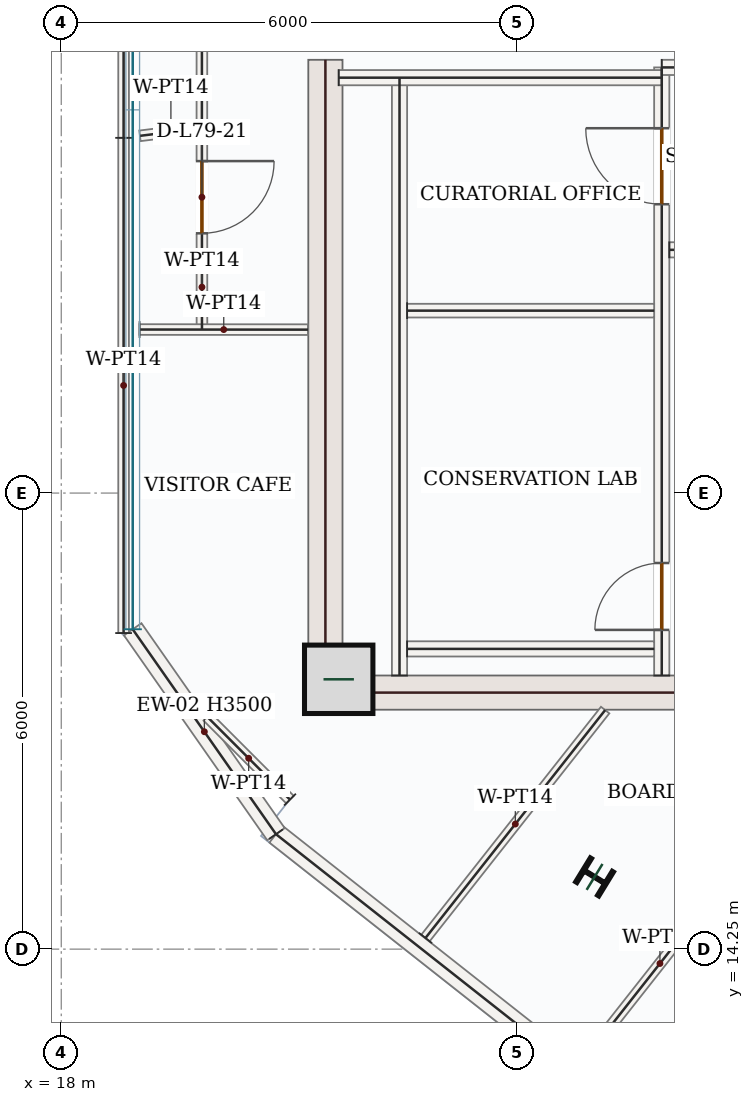
"""IFC4 building model, lengths in metres.
Left out: names, types, materials, properties, quantities, classifications, styles, units other than length and angle.
Written with IfcOpenShell. Run it as: python <this file> out.ifc"""

import sys

from ifc_helpers import new_model, si_unit, direction, frame, frame_2d, origin, origin_2d, place, context, subcontext, project, spatial, rectangle, i_section, extrude, source, transform, mapped, element, fill, save


model = new_model("IFC4")
c1 = context("Model", 3, precision=1e-05, world=origin(), true_north=direction((0.0, 1.0)))
c2 = subcontext(c1, "Body", "Model", "MODEL_VIEW")
j1 = project(units=[si_unit("LENGTHUNIT", "METRE"), si_unit("PLANEANGLEUNIT", "RADIAN")], contexts=[c1])
p1 = place(None, origin())
s1 = spatial("IfcSite", under=j1, at=p1, CompositionType="ELEMENT")
p2 = place(p1, origin())
s2 = spatial("IfcBuilding", under=s1, at=p2, CompositionType="ELEMENT")
p3 = place(p2, frame((0.0, 0.0, 327.3)))
s3 = spatial("IfcBuildingStorey", under=s2, at=p3, CompositionType="ELEMENT", Elevation=327.3)
m1 = source(origin(), c2, "Body", "SweptSolid", [
    extrude(rectangle(XDim=8.55, YDim=0.45, at=frame_2d((4.275, 0.0))), origin(), (0.0, 0.0, 1.0), 3.5),
])
p4 = place(p3, frame((21.475, 17.4, 0.0), z_axis=(0.0, 0.0, 1.0), x_axis=(0.0, 1.0, 0.0)))
e1 = element("IfcWall", 1, at=p4, inside=s3, PredefinedType="SHEAR", context=c2, shape_type="MappedRepresentation", body=[
    mapped(m1, transform((0.0, 0.0, 0.0), x_axis=(1.0, 0.0, 0.0), y_axis=(0.0, 1.0, 0.0), z_axis=(0.0, 0.0, 1.0), scale=1.0)),
])
m2 = source(origin(), c2, "Body", "SweptSolid", [
    extrude(rectangle(XDim=7.1, YDim=0.45, at=frame_2d((3.55, 0.0))), origin(), (0.0, 0.0, 1.0), 3.5),
])
p5 = place(p3, frame((21.7, 17.625, 0.0), z_axis=(0.0, 0.0, 1.0), x_axis=(1.0, 0.0, 0.0)))
e2 = element("IfcWall", 2, at=p5, inside=s3, PredefinedType="SHEAR", context=c2, shape_type="MappedRepresentation", body=[
    mapped(m2, transform((0.0, 0.0, 0.0), x_axis=(1.0, 0.0, 0.0), y_axis=(0.0, 1.0, 0.0), z_axis=(0.0, 0.0, 1.0), scale=1.0)),
])
m3 = source(origin(), c2, "Body", "SweptSolid", [
    extrude(rectangle(XDim=0.9, YDim=0.9, at=origin_2d()), origin(), (0.0, 0.0, 1.0), 3.75),
])
p6 = place(p3, frame((21.65, 17.8, 0.0), z_axis=(0.0, 0.0, 1.0), x_axis=(1.0, 0.0, 0.0)))
e3 = element("IfcColumn", 3, at=p6, inside=s3, PredefinedType="COLUMN", context=c2, shape_type="MappedRepresentation", body=[
    mapped(m3, transform((0.0, 0.0, 0.0), x_axis=(1.0, 0.0, 0.0), y_axis=(0.0, 1.0, 0.0), z_axis=(0.0, 0.0, 1.0), scale=1.0)),
])
m4 = source(origin(), c2, "Body", "SweptSolid", [
    extrude(i_section(OverallWidth=0.369, OverallDepth=0.356, WebThickness=0.011, FlangeThickness=0.018, FilletRadius=0.018, at=origin_2d()), origin(), (0.0, 0.0, 1.0), 3.75),
])
p7 = place(p3, frame((25.016, 15.2, 0.0), z_axis=(0.0, 0.0, 1.0), x_axis=(0.522498564716, 0.852640164354, 0.0)))
e4 = element("IfcColumn", 4, at=p7, inside=s3, PredefinedType="COLUMN", context=c2, shape_type="MappedRepresentation", body=[
    mapped(m4, transform((0.0, 0.0, 0.0), x_axis=(1.0, 0.0, 0.0), y_axis=(0.0, 1.0, 0.0), z_axis=(0.0, 0.0, 1.0), scale=1.0)),
])
m5 = source(origin(), c2, "Body", "SweptSolid", [
    extrude(rectangle(XDim=9.92, YDim=0.28, at=frame_2d((4.96, 0.0))), origin(), (0.0, 0.0, 1.0), 3.5),
])
p8 = place(p3, frame((28.615, 9.621, 0.0), z_axis=(0.0, 0.0, 1.0), x_axis=(-0.785317257435, 0.619093535077, 0.0)))
e5 = element("IfcWall", 5, at=p8, inside=s3, PredefinedType="SOLIDWALL", context=c2, shape_type="MappedRepresentation", body=[
    mapped(m5, transform((0.0, 0.0, 0.0), x_axis=(1.0, 0.0, 0.0), y_axis=(0.0, 1.0, 0.0), z_axis=(0.0, 0.0, 1.0), scale=1.0)),
])
m6 = source(origin(), c2, "Body", "SweptSolid", [
    extrude(rectangle(XDim=3.29, YDim=0.28, at=frame_2d((1.645, 0.0))), origin(), (0.0, 0.0, 1.0), 3.5),
])
p9 = place(p3, frame((20.825, 15.762, 0.0), z_axis=(0.0, 0.0, 1.0), x_axis=(-0.573043854491, 0.819524704222, 0.0)))
e6 = element("IfcWall", 6, at=p9, inside=s3, PredefinedType="SOLIDWALL", context=c2, shape_type="MappedRepresentation", body=[
    mapped(m6, transform((0.0, 0.0, 0.0), x_axis=(1.0, 0.0, 0.0), y_axis=(0.0, 1.0, 0.0), z_axis=(0.0, 0.0, 1.0), scale=1.0)),
])
m7 = source(origin(), c2, "Body", "SweptSolid", [
    extrude(rectangle(XDim=7.87, YDim=0.2, at=frame_2d((3.935, 0.0))), origin(), (0.0, 0.0, 1.0), 3.5),
])
p10 = place(p3, frame((22.45, 17.85, 0.0), z_axis=(0.0, 0.0, 1.0), x_axis=(0.0, 1.0, 0.0)))
e7 = element("IfcWall", 7, at=p10, inside=s3, PredefinedType="SOLIDWALL", context=c2, shape_type="MappedRepresentation", body=[
    mapped(m7, transform((0.0, 0.0, 0.0), x_axis=(1.0, 0.0, 0.0), y_axis=(0.0, 1.0, 0.0), z_axis=(0.0, 0.0, 1.0), scale=1.0)),
])
p11 = place(p3, frame((25.9, 17.85, 0.0), z_axis=(0.0, 0.0, 1.0), x_axis=(0.0, 1.0, 0.0)))
e8 = element("IfcWall", 8, at=p11, inside=s3, PredefinedType="SOLIDWALL", context=c2, shape_type="SweptSolid", body=[
    extrude(rectangle(XDim=8.0, YDim=0.2, at=frame_2d((4.0, 0.0))), origin(), (0.0, 0.0, 1.0), 3.5),
])
p12 = place(p11, frame((6.2, 0.0, 0.0)))
e9 = element("IfcOpeningElement", 9, at=p12, cuts=e8, PredefinedType="OPENING", context=c2, shape_type="SweptSolid", body=[
    extrude(rectangle(XDim=1.0, YDim=2.15, at=frame_2d((0.5, 1.075))), frame((0.0, 0.11, 0.0), z_axis=(0.0, -1.0, 0.0), x_axis=(1.0, 0.0, 0.0)), (0.0, 0.0, 1.0), 0.22),
])
p13 = place(p11, frame((0.6, 0.0, 0.0)))
e10 = element("IfcOpeningElement", 10, at=p13, cuts=e8, PredefinedType="OPENING", context=c2, shape_type="SweptSolid", body=[
    extrude(rectangle(XDim=0.88, YDim=2.1, at=frame_2d((0.44, 1.05))), frame((0.0, 0.11, 0.0), z_axis=(0.0, -1.0, 0.0), x_axis=(1.0, 0.0, 0.0)), (0.0, 0.0, 1.0), 0.22),
])
m8 = source(origin(), c2, "Body", "SweptSolid", [
    extrude(rectangle(XDim=4.25, YDim=0.2, at=frame_2d((2.125, 0.0))), origin(), (0.0, 0.0, 1.0), 3.5),
])
p14 = place(p3, frame((21.65, 25.715, 0.0), z_axis=(0.0, 0.0, 1.0), x_axis=(1.0, 0.0, 0.0)))
e11 = element("IfcWall", 11, at=p14, inside=s3, PredefinedType="SOLIDWALL", context=c2, shape_type="MappedRepresentation", body=[
    mapped(m8, transform((0.0, 0.0, 0.0), x_axis=(1.0, 0.0, 0.0), y_axis=(0.0, 1.0, 0.0), z_axis=(0.0, 0.0, 1.0), scale=1.0)),
])
m9 = source(origin(), c2, "Body", "SweptSolid", [
    extrude(rectangle(XDim=3.0, YDim=0.2, at=frame_2d((1.5, 0.0))), origin(), (0.0, 0.0, 1.0), 3.5),
])
p15 = place(p3, frame((25.9, 25.85, 0.0), z_axis=(0.0, 0.0, 1.0), x_axis=(1.0, 0.0, 0.0)))
e12 = element("IfcWall", 12, at=p15, inside=s3, PredefinedType="SOLIDWALL", context=c2, shape_type="MappedRepresentation", body=[
    mapped(m9, transform((0.0, 0.0, 0.0), x_axis=(1.0, 0.0, 0.0), y_axis=(0.0, 1.0, 0.0), z_axis=(0.0, 0.0, 1.0), scale=1.0)),
])
m10 = source(origin(), c2, "Body", "SweptSolid", [
    extrude(rectangle(XDim=3.25, YDim=0.2, at=frame_2d((1.625, 0.0))), origin(), (0.0, 0.0, 1.0), 3.5),
])
p16 = place(p3, frame((22.55, 18.2, 0.0), z_axis=(0.0, 0.0, 1.0), x_axis=(1.0, 0.0, 0.0)))
e13 = element("IfcWall", 13, at=p16, inside=s3, PredefinedType="SOLIDWALL", context=c2, shape_type="MappedRepresentation", body=[
    mapped(m10, transform((0.0, 0.0, 0.0), x_axis=(1.0, 0.0, 0.0), y_axis=(0.0, 1.0, 0.0), z_axis=(0.0, 0.0, 1.0), scale=1.0)),
])
m11 = source(origin(), c2, "Body", "SweptSolid", [
    extrude(rectangle(XDim=3.25, YDim=0.18, at=frame_2d((1.625, 0.0))), origin(), (0.0, 0.0, 1.0), 3.5),
])
p17 = place(p3, frame((22.55, 22.65, 0.0), z_axis=(0.0, 0.0, 1.0), x_axis=(1.0, 0.0, 0.0)))
e14 = element("IfcWall", 14, at=p17, inside=s3, PredefinedType="PARTITIONING", context=c2, shape_type="MappedRepresentation", body=[
    mapped(m11, transform((0.0, 0.0, 0.0), x_axis=(1.0, 0.0, 0.0), y_axis=(0.0, 1.0, 0.0), z_axis=(0.0, 0.0, 1.0), scale=1.0)),
])
m12 = source(origin(), c2, "Body", "SweptSolid", [
    extrude(rectangle(XDim=2.75, YDim=0.2, at=frame_2d((1.375, 0.0))), origin(), (0.0, 0.0, 1.0), 3.5),
])
p18 = place(p3, frame((26.0, 23.45, 0.0), z_axis=(0.0, 0.0, 1.0), x_axis=(1.0, 0.0, 0.0)))
e15 = element("IfcWall", 15, at=p18, inside=s3, PredefinedType="SOLIDWALL", context=c2, shape_type="MappedRepresentation", body=[
    mapped(m12, transform((0.0, 0.0, 0.0), x_axis=(1.0, 0.0, 0.0), y_axis=(0.0, 1.0, 0.0), z_axis=(0.0, 0.0, 1.0), scale=1.0)),
])
m13 = source(origin(), c2, "Body", "SweptSolid", [
    extrude(rectangle(XDim=3.818, YDim=0.14, at=frame_2d((1.909, 0.0))), origin(), (0.0, 0.0, 1.0), 3.5),
])
p19 = place(p3, frame((22.792, 14.396, 0.0), z_axis=(0.0, 0.0, 1.0), x_axis=(0.619119655452, 0.78529666511, 0.0)))
e16 = element("IfcWall", 16, at=p19, inside=s3, PredefinedType="PARTITIONING", context=c2, shape_type="MappedRepresentation", body=[
    mapped(m13, transform((0.0, 0.0, 0.0), x_axis=(1.0, 0.0, 0.0), y_axis=(0.0, 1.0, 0.0), z_axis=(0.0, 0.0, 1.0), scale=1.0)),
])
p20 = place(p3, frame((28.177, 16.98, 0.0), z_axis=(0.0, 0.0, 1.0), x_axis=(-0.619105408422, -0.785307897109, 0.0)))
e17 = element("IfcWall", 17, at=p20, inside=s3, PredefinedType="PARTITIONING", context=c2, shape_type="SweptSolid", body=[
    extrude(rectangle(XDim=5.363, YDim=0.14, at=frame_2d((2.682, 0.0))), origin(), (0.0, 0.0, 1.0), 3.5),
])
p21 = place(p20, frame((0.971, 0.0, 0.0)))
e18 = element("IfcOpeningElement", 18, at=p21, cuts=e17, PredefinedType="OPENING", context=c2, shape_type="SweptSolid", body=[
    extrude(rectangle(XDim=0.95, YDim=2.15, at=frame_2d((0.475, 1.075))), frame((0.0, 0.08, 0.0), z_axis=(0.0, -1.0, 0.0), x_axis=(1.0, 0.0, 0.0)), (0.0, 0.0, 1.0), 0.16),
])
p22 = place(p3, frame((19.853, 31.523, 0.0), z_axis=(0.0, 0.0, 1.0), x_axis=(-0.000377187662, -0.999999928865, 0.0)))
e19 = element("IfcWall", 19, at=p22, inside=s3, PredefinedType="PARTITIONING", context=c2, shape_type="SweptSolid", body=[
    extrude(rectangle(XDim=6.473, YDim=0.14, at=frame_2d((3.236, 0.0))), origin(), (0.0, 0.0, 1.0), 3.5),
])
p23 = place(p22, frame((4.308, 0.0, 0.0)))
e20 = element("IfcOpeningElement", 20, at=p23, cuts=e19, PredefinedType="OPENING", context=c2, shape_type="SweptSolid", body=[
    extrude(rectangle(XDim=0.95, YDim=2.15, at=frame_2d((0.475, 1.075))), frame((0.0, 0.08, 0.0), z_axis=(0.0, -1.0, 0.0), x_axis=(1.0, 0.0, 0.0)), (0.0, 0.0, 1.0), 0.16),
])
m14 = source(origin(), c2, "Body", "SweptSolid", [
    extrude(rectangle(XDim=0.821, YDim=0.14, at=frame_2d((0.41, 0.0))), origin(), (0.0, 0.0, 1.0), 3.5),
])
p24 = place(p3, frame((19.85, 25.05, 0.0), z_axis=(0.0, 0.0, 1.0), x_axis=(-0.992500466698, -0.122240842617, 0.0)))
e21 = element("IfcWall", 21, at=p24, inside=s3, PredefinedType="PARTITIONING", context=c2, shape_type="MappedRepresentation", body=[
    mapped(m14, transform((0.0, 0.0, 0.0), x_axis=(1.0, 0.0, 0.0), y_axis=(0.0, 1.0, 0.0), z_axis=(0.0, 0.0, 1.0), scale=1.0)),
])
m15 = source(origin(), c2, "Body", "SweptSolid", [
    extrude(rectangle(XDim=6.968, YDim=0.14, at=frame_2d((3.484, 0.0))), origin(), (0.0, 0.0, 1.0), 3.5),
])
p25 = place(p3, frame((18.82, 24.923, 0.0), z_axis=(0.0, 0.0, 1.0), x_axis=(0.0, 1.0, 0.0)))
e22 = element("IfcWall", 22, at=p25, inside=s3, PredefinedType="PARTITIONING", context=c2, shape_type="MappedRepresentation", body=[
    mapped(m15, transform((0.0, 0.0, 0.0), x_axis=(1.0, 0.0, 0.0), y_axis=(0.0, 1.0, 0.0), z_axis=(0.0, 0.0, 1.0), scale=1.0)),
])
p26 = place(p3, frame((19.85, 24.975, 0.0), z_axis=(0.0, 0.0, 1.0), x_axis=(0.000379434615, -0.999999928015, 0.0)))
e23 = element("IfcWall", 23, at=p26, inside=s3, PredefinedType="PARTITIONING", context=c2, shape_type="SweptSolid", body=[
    extrude(rectangle(XDim=2.574, YDim=0.14, at=frame_2d((1.287, 0.0))), origin(), (0.0, 0.0, 1.0), 3.5),
])
p27 = place(p26, frame((0.357, 0.0, 0.0)))
e24 = element("IfcOpeningElement", 24, at=p27, cuts=e23, PredefinedType="OPENING", context=c2, shape_type="SweptSolid", body=[
    extrude(rectangle(XDim=0.95, YDim=2.15, at=frame_2d((0.475, 1.075))), frame((0.0, 0.08, 0.0), z_axis=(0.0, -1.0, 0.0), x_axis=(1.0, 0.0, 0.0)), (0.0, 0.0, 1.0), 0.16),
])
m16 = source(origin(), c2, "Body", "SweptSolid", [
    extrude(rectangle(XDim=2.215, YDim=0.14, at=frame_2d((1.107, 0.0))), origin(), (0.0, 0.0, 1.0), 3.5),
])
p28 = place(p3, frame((19.03, 22.402, 0.0), z_axis=(0.0, 0.0, 1.0), x_axis=(0.999999702379, -0.000771519665, 0.0)))
e25 = element("IfcWall", 25, at=p28, inside=s3, PredefinedType="PARTITIONING", context=c2, shape_type="MappedRepresentation", body=[
    mapped(m16, transform((0.0, 0.0, 0.0), x_axis=(1.0, 0.0, 0.0), y_axis=(0.0, 1.0, 0.0), z_axis=(0.0, 0.0, 1.0), scale=1.0)),
])
m17 = source(origin(), c2, "Body", "SweptSolid", [
    extrude(rectangle(XDim=1.538, YDim=0.14, at=frame_2d((0.769, 0.0))), origin(), (0.0, 0.0, 1.0), 3.5),
])
p29 = place(p3, frame((21.009, 16.217, 0.0), z_axis=(0.0, 0.0, 1.0), x_axis=(-0.706709909315, 0.707503430434, 0.0)))
e26 = element("IfcWall", 26, at=p29, inside=s3, PredefinedType="PARTITIONING", context=c2, shape_type="MappedRepresentation", body=[
    mapped(m17, transform((0.0, 0.0, 0.0), x_axis=(1.0, 0.0, 0.0), y_axis=(0.0, 1.0, 0.0), z_axis=(0.0, 0.0, 1.0), scale=1.0)),
])
m18 = source(origin(), c2, "Body", "SweptSolid", [
    extrude(rectangle(XDim=6.515, YDim=0.14, at=frame_2d((3.258, 0.0))), origin(), (0.0, 0.0, 1.0), 3.5),
])
p30 = place(p3, frame((18.82, 18.408, 0.0), z_axis=(0.0, 0.0, 1.0), x_axis=(0.0, 1.0, 0.0)))
e27 = element("IfcWall", 27, at=p30, inside=s3, PredefinedType="PARTITIONING", context=c2, shape_type="MappedRepresentation", body=[
    mapped(m18, transform((0.0, 0.0, 0.0), x_axis=(1.0, 0.0, 0.0), y_axis=(0.0, 1.0, 0.0), z_axis=(0.0, 0.0, 1.0), scale=1.0)),
])
m19 = source(origin(), c2, "Body", "SweptSolid", [
    extrude(rectangle(XDim=1.0, YDim=2.15, at=frame_2d((0.5, 1.075))), frame((0.0, 0.025, 0.0), z_axis=(0.0, -1.0, 0.0), x_axis=(1.0, 0.0, 0.0)), (0.0, 0.0, 1.0), 0.05),
])
p31 = place(p12, origin())
e28 = element("IfcDoor", 28, at=p31, inside=s3, OperationType="SINGLE_SWING_RIGHT", PredefinedType="DOOR", context=c2, shape_type="MappedRepresentation", body=[
    mapped(m19, transform((0.0, 0.0, 0.0), x_axis=(1.0, 0.0, 0.0), y_axis=(0.0, 1.0, 0.0), z_axis=(0.0, 0.0, 1.0), scale=1.0)),
])
fill(e9, e28)
m20 = source(origin(), c2, "Body", "SweptSolid", [
    extrude(rectangle(XDim=0.88, YDim=2.1, at=frame_2d((0.44, 1.05))), frame((0.0, 0.025, 0.0), z_axis=(0.0, -1.0, 0.0), x_axis=(1.0, 0.0, 0.0)), (0.0, 0.0, 1.0), 0.05),
])
p32 = place(p13, origin())
e29 = element("IfcDoor", 29, at=p32, inside=s3, OperationType="SINGLE_SWING_LEFT", PredefinedType="DOOR", context=c2, shape_type="MappedRepresentation", body=[
    mapped(m20, transform((0.0, 0.0, 0.0), x_axis=(1.0, 0.0, 0.0), y_axis=(0.0, 1.0, 0.0), z_axis=(0.0, 0.0, 1.0), scale=1.0)),
])
fill(e10, e29)
m21 = source(origin(), c2, "Body", "SweptSolid", [
    extrude(rectangle(XDim=0.95, YDim=2.15, at=frame_2d((0.475, 1.075))), frame((0.0, 0.025, 0.0), z_axis=(0.0, -1.0, 0.0), x_axis=(1.0, 0.0, 0.0)), (0.0, 0.0, 1.0), 0.05),
])
p33 = place(p27, origin())
e30 = element("IfcDoor", 30, at=p33, inside=s3, OperationType="SINGLE_SWING_LEFT", PredefinedType="DOOR", context=c2, shape_type="MappedRepresentation", body=[
    mapped(m21, transform((0.0, 0.0, 0.0), x_axis=(1.0, 0.0, 0.0), y_axis=(0.0, 1.0, 0.0), z_axis=(0.0, 0.0, 1.0), scale=1.0)),
])
fill(e24, e30)
save(model, sys.argv[1])
